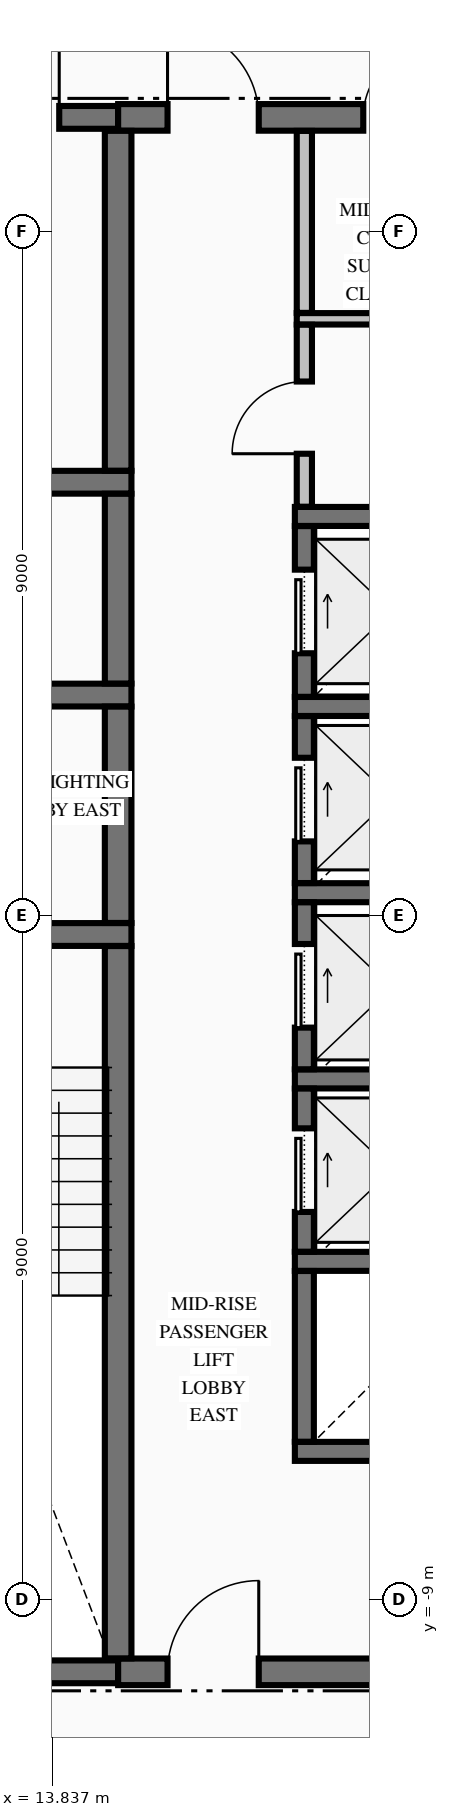
"""IFC4 building model, lengths in metres.
Left out: names, types, materials, properties, quantities, classifications, styles, units other than length and angle.
Written with IfcOpenShell. Run it as: python <this file> out.ifc"""

import sys

from ifc_helpers import new_model, si_unit, direction, frame, frame_2d, origin, place, context, subcontext, project, spatial, rectangle, extrude, element, fill, save


model = new_model("IFC4")
c1 = context("Model", 3, precision=1e-05, world=origin(), true_north=direction((0.0, 1.0)))
c2 = subcontext(c1, "Body", "Model", "MODEL_VIEW")
j1 = project(units=[si_unit("LENGTHUNIT", "METRE"), si_unit("PLANEANGLEUNIT", "RADIAN")], contexts=[c1])
p1 = place(None, origin())
s1 = spatial("IfcSite", under=j1, at=p1, CompositionType="ELEMENT")
p2 = place(p1, origin())
s2 = spatial("IfcBuilding", under=s1, at=p2, CompositionType="ELEMENT")
p3 = place(p2, frame((0.0, 0.0, 94.93)))
s3 = spatial("IfcBuildingStorey", under=s2, at=p3, CompositionType="ELEMENT", Elevation=94.93)
p4 = place(p3, frame((11.504, -9.95, 0.0), z_axis=(0.0, 0.0, 1.0), x_axis=(1.0, 0.0, 0.0)))
e1 = element("IfcWall", 1, at=p4, inside=s3, PredefinedType="SHEAR", context=c2, shape_type="SweptSolid", body=[
    extrude(rectangle(XDim=3.196, YDim=0.3, at=frame_2d((1.598, 0.0))), origin(), (0.0, 0.0, 1.0), 3.295),
])
p5 = place(p3, frame((14.7, -9.95, 0.0), z_axis=(0.0, 0.0, 1.0), x_axis=(1.0, 0.0, 0.0)))
e2 = element("IfcWall", 2, at=p5, inside=s3, PredefinedType="SHEAR", context=c2, shape_type="SweptSolid", body=[
    extrude(rectangle(XDim=4.796, YDim=0.35, at=frame_2d((2.398, 0.0))), origin(), (0.0, 0.0, 1.0), 3.295),
])
p6 = place(p5, frame((0.65, 0.0, 0.0)))
e3 = element("IfcOpeningElement", 3, at=p6, cuts=e2, PredefinedType="OPENING", context=c2, shape_type="SweptSolid", body=[
    extrude(rectangle(XDim=1.2, YDim=2.15, at=frame_2d((0.6, 1.075))), frame((0.0, 0.185, 0.0), z_axis=(0.0, -1.0, 0.0), x_axis=(1.0, 0.0, 0.0)), (0.0, 0.0, 1.0), 0.37),
])
for number, where, z_axis, x_axis in (
    (4, (17.025, -7.05, 0.0), (0.0, 0.0, 1.0), (1.0, 0.0, 0.0)),
    (5, (17.025, -4.55, 0.0), (0.0, 0.0, 1.0), (1.0, 0.0, 0.0)),
    (6, (17.025, -2.15, 0.0), (0.0, 0.0, 1.0), (1.0, 0.0, 0.0)),
):
    element("IfcWall", number, at=place(p3, frame(where, z_axis=z_axis, x_axis=x_axis)), inside=s3, PredefinedType="SOLIDWALL", context=c2, shape_type="SweptSolid", body=[
        extrude(rectangle(XDim=3.15, YDim=0.25, at=frame_2d((1.575, 0.0))), origin(), (0.0, 0.0, 1.0), 3.295),
    ])
p7 = place(p3, frame((11.504, -0.25, 0.0), z_axis=(0.0, 0.0, 1.0), x_axis=(1.0, 0.0, 0.0)))
e7 = element("IfcWall", 7, at=p7, inside=s3, PredefinedType="SHEAR", context=c2, shape_type="SweptSolid", body=[
    extrude(rectangle(XDim=3.371, YDim=0.3, at=frame_2d((1.686, 0.0))), origin(), (0.0, 0.0, 1.0), 3.295),
])
p8 = place(p7, frame((1.096, 0.0, 0.0)))
e8 = element("IfcOpeningElement", 8, at=p8, cuts=e7, PredefinedType="OPENING", context=c2, shape_type="SweptSolid", body=[
    extrude(rectangle(XDim=1.1, YDim=2.15, at=frame_2d((0.55, 1.075))), frame((0.0, 0.16, 0.0), z_axis=(0.0, -1.0, 0.0), x_axis=(1.0, 0.0, 0.0)), (0.0, 0.0, 1.0), 0.32),
])
p9 = place(p3, frame((17.025, 0.3, 0.0), z_axis=(0.0, 0.0, 1.0), x_axis=(1.0, 0.0, 0.0)))
e9 = element("IfcWall", 9, at=p9, inside=s3, PredefinedType="SOLIDWALL", context=c2, shape_type="SweptSolid", body=[
    extrude(rectangle(XDim=2.471, YDim=0.25, at=frame_2d((1.236, 0.0))), origin(), (0.0, 0.0, 1.0), 3.295),
])
p10 = place(p3, frame((17.025, 2.75, 0.0), z_axis=(0.0, 0.0, 1.0), x_axis=(1.0, 0.0, 0.0)))
e10 = element("IfcWall", 10, at=p10, inside=s3, PredefinedType="SOLIDWALL", context=c2, shape_type="SweptSolid", body=[
    extrude(rectangle(XDim=3.15, YDim=0.25, at=frame_2d((1.575, 0.0))), origin(), (0.0, 0.0, 1.0), 3.295),
])
p11 = place(p3, frame((10.85, 2.9, 0.0), z_axis=(0.0, 0.0, 1.0), x_axis=(1.0, 0.0, 0.0)))
e11 = element("IfcWall", 11, at=p11, inside=s3, PredefinedType="SHEAR", context=c2, shape_type="SweptSolid", body=[
    extrude(rectangle(XDim=4.025, YDim=0.3, at=frame_2d((2.012, 0.0))), origin(), (0.0, 0.0, 1.0), 3.295),
])
p12 = place(p11, frame((0.85, 0.0, 0.0)))
e12 = element("IfcOpeningElement", 12, at=p12, cuts=e11, PredefinedType="OPENING", context=c2, shape_type="SweptSolid", body=[
    extrude(rectangle(XDim=1.1, YDim=2.2, at=frame_2d((0.55, 1.1))), frame((0.0, 0.16, 0.0), z_axis=(0.0, -1.0, 0.0), x_axis=(1.0, 0.0, 0.0)), (0.0, 0.0, 1.0), 0.32),
])
p13 = place(p3, frame((17.025, 5.25, 0.0), z_axis=(0.0, 0.0, 1.0), x_axis=(1.0, 0.0, 0.0)))
e13 = element("IfcWall", 13, at=p13, inside=s3, PredefinedType="SOLIDWALL", context=c2, shape_type="SweptSolid", body=[
    extrude(rectangle(XDim=3.15, YDim=0.25, at=frame_2d((1.575, 0.0))), origin(), (0.0, 0.0, 1.0), 3.295),
])
p14 = place(p3, frame((10.85, 5.7, 0.0), z_axis=(0.0, 0.0, 1.0), x_axis=(1.0, 0.0, 0.0)))
e14 = element("IfcWall", 14, at=p14, inside=s3, PredefinedType="SHEAR", context=c2, shape_type="SweptSolid", body=[
    extrude(rectangle(XDim=4.025, YDim=0.3, at=frame_2d((2.012, 0.0))), origin(), (0.0, 0.0, 1.0), 3.295),
])
p15 = place(p3, frame((11.504, 10.5, 0.0), z_axis=(0.0, 0.0, 1.0), x_axis=(1.0, 0.0, 0.0)))
e15 = element("IfcWall", 15, at=p15, inside=s3, PredefinedType="SHEAR", context=c2, shape_type="SweptSolid", body=[
    extrude(rectangle(XDim=3.196, YDim=0.3, at=frame_2d((1.598, 0.0))), origin(), (0.0, 0.0, 1.0), 3.295),
])
p16 = place(p15, frame((1.471, 0.0, 0.0)))
e16 = element("IfcOpeningElement", 16, at=p16, cuts=e15, PredefinedType="OPENING", context=c2, shape_type="SweptSolid", body=[
    extrude(rectangle(XDim=0.95, YDim=2.15, at=frame_2d((0.475, 1.075))), frame((0.0, 0.16, 0.0), z_axis=(0.0, -1.0, 0.0), x_axis=(1.0, 0.0, 0.0)), (0.0, 0.0, 1.0), 0.32),
])
p17 = place(p3, frame((14.7, 10.5, 0.0), z_axis=(0.0, 0.0, 1.0), x_axis=(1.0, 0.0, 0.0)))
e17 = element("IfcWall", 17, at=p17, inside=s3, PredefinedType="SHEAR", context=c2, shape_type="SweptSolid", body=[
    extrude(rectangle(XDim=4.796, YDim=0.35, at=frame_2d((2.398, 0.0))), origin(), (0.0, 0.0, 1.0), 3.295),
])
p18 = place(p17, frame((0.65, 0.0, 0.0)))
e18 = element("IfcOpeningElement", 18, at=p18, cuts=e17, PredefinedType="OPENING", context=c2, shape_type="SweptSolid", body=[
    extrude(rectangle(XDim=1.2, YDim=2.15, at=frame_2d((0.6, 1.075))), frame((0.0, 0.185, 0.0), z_axis=(0.0, -1.0, 0.0), x_axis=(1.0, 0.0, 0.0)), (0.0, 0.0, 1.0), 0.37),
])
p19 = place(p17, frame((3.225, 0.0, 0.0)))
e19 = element("IfcOpeningElement", 19, at=p19, cuts=e17, PredefinedType="OPENING", context=c2, shape_type="SweptSolid", body=[
    extrude(rectangle(XDim=0.95, YDim=2.15, at=frame_2d((0.475, 1.075))), frame((0.0, 0.185, 0.0), z_axis=(0.0, -1.0, 0.0), x_axis=(1.0, 0.0, 0.0)), (0.0, 0.0, 1.0), 0.37),
])
p20 = place(p3, frame((17.05, 7.85, 0.0), z_axis=(0.0, 0.0, 1.0), x_axis=(1.0, 0.0, 0.0)))
e20 = element("IfcWall", 20, at=p20, inside=s3, PredefinedType="PARTITIONING", context=c2, shape_type="SweptSolid", body=[
    extrude(rectangle(XDim=2.772, YDim=0.15, at=frame_2d((1.386, 0.0))), origin(), (0.0, 0.0, 1.0), 3.295),
])
p21 = place(p3, frame((14.7, -9.773, 0.0), z_axis=(0.0, 0.0, 1.0), x_axis=(0.0, 1.0, 0.0)))
e21 = element("IfcWall", 21, at=p21, inside=s3, PredefinedType="SHEAR", context=c2, shape_type="SweptSolid", body=[
    extrude(rectangle(XDim=9.371, YDim=0.35, at=frame_2d((4.686, 0.0))), origin(), (0.0, 0.0, 1.0), 3.295),
])
p22 = place(p3, frame((14.7, -0.098, 0.0), z_axis=(0.0, 0.0, 1.0), x_axis=(0.0, 1.0, 0.0)))
e22 = element("IfcWall", 22, at=p22, inside=s3, PredefinedType="SHEAR", context=c2, shape_type="SweptSolid", body=[
    extrude(rectangle(XDim=2.846, YDim=0.35, at=frame_2d((1.423, 0.0))), origin(), (0.0, 0.0, 1.0), 3.295),
])
p23 = place(p3, frame((14.7, 3.052, 0.0), z_axis=(0.0, 0.0, 1.0), x_axis=(0.0, 1.0, 0.0)))
e23 = element("IfcWall", 23, at=p23, inside=s3, PredefinedType="SHEAR", context=c2, shape_type="SweptSolid", body=[
    extrude(rectangle(XDim=2.496, YDim=0.35, at=frame_2d((1.248, 0.0))), origin(), (0.0, 0.0, 1.0), 3.295),
])
p24 = place(p3, frame((14.7, 5.852, 0.0), z_axis=(0.0, 0.0, 1.0), x_axis=(0.0, 1.0, 0.0)))
e24 = element("IfcWall", 24, at=p24, inside=s3, PredefinedType="SHEAR", context=c2, shape_type="SweptSolid", body=[
    extrude(rectangle(XDim=4.471, YDim=0.35, at=frame_2d((2.235, 0.0))), origin(), (0.0, 0.0, 1.0), 3.295),
])
p25 = place(p3, frame((17.15, -6.923, 0.0), z_axis=(0.0, 0.0, 1.0), x_axis=(0.0, 1.0, 0.0)))
e25 = element("IfcWall", 25, at=p25, inside=s3, PredefinedType="SOLIDWALL", context=c2, shape_type="SweptSolid", body=[
    extrude(rectangle(XDim=2.246, YDim=0.25, at=frame_2d((1.123, 0.0))), origin(), (0.0, 0.0, 1.0), 3.295),
])
p26 = place(p3, frame((17.15, -4.423, 0.0), z_axis=(0.0, 0.0, 1.0), x_axis=(0.0, 1.0, 0.0)))
e26 = element("IfcWall", 26, at=p26, inside=s3, PredefinedType="SOLIDWALL", context=c2, shape_type="SweptSolid", body=[
    extrude(rectangle(XDim=2.146, YDim=0.25, at=frame_2d((1.073, 0.0))), origin(), (0.0, 0.0, 1.0), 3.295),
])
p27 = place(p26, frame((0.523, 0.0, 0.0)))
e27 = element("IfcOpeningElement", 27, at=p27, cuts=e26, PredefinedType="OPENING", context=c2, shape_type="SweptSolid", body=[
    extrude(rectangle(XDim=1.1, YDim=2.2, at=frame_2d((0.55, 1.1))), frame((0.0, 0.135, 0.0), z_axis=(0.0, -1.0, 0.0), x_axis=(1.0, 0.0, 0.0)), (0.0, 0.0, 1.0), 0.27),
])
p28 = place(p3, frame((17.15, -2.023, 0.0), z_axis=(0.0, 0.0, 1.0), x_axis=(0.0, 1.0, 0.0)))
e28 = element("IfcWall", 28, at=p28, inside=s3, PredefinedType="SOLIDWALL", context=c2, shape_type="SweptSolid", body=[
    extrude(rectangle(XDim=2.196, YDim=0.25, at=frame_2d((1.098, 0.0))), origin(), (0.0, 0.0, 1.0), 3.295),
])
p29 = place(p28, frame((0.548, 0.0, 0.0)))
e29 = element("IfcOpeningElement", 29, at=p29, cuts=e28, PredefinedType="OPENING", context=c2, shape_type="SweptSolid", body=[
    extrude(rectangle(XDim=1.1, YDim=2.2, at=frame_2d((0.55, 1.1))), frame((0.0, 0.135, 0.0), z_axis=(0.0, -1.0, 0.0), x_axis=(1.0, 0.0, 0.0)), (0.0, 0.0, 1.0), 0.27),
])
p30 = place(p3, frame((17.15, 0.427, 0.0), z_axis=(0.0, 0.0, 1.0), x_axis=(0.0, 1.0, 0.0)))
e30 = element("IfcWall", 30, at=p30, inside=s3, PredefinedType="SOLIDWALL", context=c2, shape_type="SweptSolid", body=[
    extrude(rectangle(XDim=2.196, YDim=0.25, at=frame_2d((1.098, 0.0))), origin(), (0.0, 0.0, 1.0), 3.295),
])
p31 = place(p30, frame((0.548, 0.0, 0.0)))
e31 = element("IfcOpeningElement", 31, at=p31, cuts=e30, PredefinedType="OPENING", context=c2, shape_type="SweptSolid", body=[
    extrude(rectangle(XDim=1.1, YDim=2.2, at=frame_2d((0.55, 1.1))), frame((0.0, 0.135, 0.0), z_axis=(0.0, -1.0, 0.0), x_axis=(1.0, 0.0, 0.0)), (0.0, 0.0, 1.0), 0.27),
])
p32 = place(p3, frame((17.15, 2.877, 0.0), z_axis=(0.0, 0.0, 1.0), x_axis=(0.0, 1.0, 0.0)))
e32 = element("IfcWall", 32, at=p32, inside=s3, PredefinedType="SOLIDWALL", context=c2, shape_type="SweptSolid", body=[
    extrude(rectangle(XDim=2.246, YDim=0.25, at=frame_2d((1.123, 0.0))), origin(), (0.0, 0.0, 1.0), 3.295),
])
p33 = place(p32, frame((0.573, 0.0, 0.0)))
e33 = element("IfcOpeningElement", 33, at=p33, cuts=e32, PredefinedType="OPENING", context=c2, shape_type="SweptSolid", body=[
    extrude(rectangle(XDim=1.1, YDim=2.2, at=frame_2d((0.55, 1.1))), frame((0.0, 0.135, 0.0), z_axis=(0.0, -1.0, 0.0), x_axis=(1.0, 0.0, 0.0)), (0.0, 0.0, 1.0), 0.27),
])
p34 = place(p3, frame((17.15, 5.378, 0.0), z_axis=(0.0, 0.0, 1.0), x_axis=(0.0, 1.0, 0.0)))
e34 = element("IfcWall", 34, at=p34, inside=s3, PredefinedType="PARTITIONING", context=c2, shape_type="SweptSolid", body=[
    extrude(rectangle(XDim=2.394, YDim=0.2, at=frame_2d((1.197, 0.0))), origin(), (0.0, 0.0, 1.0), 3.295),
])
p35 = place(p34, frame((0.697, 0.0, 0.0)))
e35 = element("IfcOpeningElement", 35, at=p35, cuts=e34, PredefinedType="OPENING", context=c2, shape_type="SweptSolid", body=[
    extrude(rectangle(XDim=0.95, YDim=2.15, at=frame_2d((0.475, 1.075))), frame((0.0, 0.11, 0.0), z_axis=(0.0, -1.0, 0.0), x_axis=(1.0, 0.0, 0.0)), (0.0, 0.0, 1.0), 0.22),
])
p36 = place(p3, frame((17.15, 7.928, 0.0), z_axis=(0.0, 0.0, 1.0), x_axis=(0.0, 1.0, 0.0)))
e36 = element("IfcWall", 36, at=p36, inside=s3, PredefinedType="PARTITIONING", context=c2, shape_type="SweptSolid", body=[
    extrude(rectangle(XDim=2.394, YDim=0.2, at=frame_2d((1.197, 0.0))), origin(), (0.0, 0.0, 1.0), 3.295),
])
p37 = place(p16, origin())
e37 = element("IfcDoor", 37, at=p37, inside=s3, OperationType="SINGLE_SWING_RIGHT", PredefinedType="DOOR", context=c2, shape_type="SweptSolid", body=[
    extrude(rectangle(XDim=0.95, YDim=2.15, at=frame_2d((0.475, 1.075))), frame((0.0, 0.025, 0.0), z_axis=(0.0, -1.0, 0.0), x_axis=(1.0, 0.0, 0.0)), (0.0, 0.0, 1.0), 0.05),
])
fill(e16, e37)
p38 = place(p27, origin())
e38 = element("IfcDoor", 38, at=p38, inside=s3, OperationType="SLIDING_TO_RIGHT", PredefinedType="DOOR", context=c2, shape_type="SweptSolid", body=[
    extrude(rectangle(XDim=1.1, YDim=2.2, at=frame_2d((0.55, 1.1))), frame((0.0, 0.025, 0.0), z_axis=(0.0, -1.0, 0.0), x_axis=(1.0, 0.0, 0.0)), (0.0, 0.0, 1.0), 0.05),
])
fill(e27, e38)
p39 = place(p29, origin())
e39 = element("IfcDoor", 39, at=p39, inside=s3, OperationType="SLIDING_TO_RIGHT", PredefinedType="DOOR", context=c2, shape_type="SweptSolid", body=[
    extrude(rectangle(XDim=1.1, YDim=2.2, at=frame_2d((0.55, 1.1))), frame((0.0, 0.025, 0.0), z_axis=(0.0, -1.0, 0.0), x_axis=(1.0, 0.0, 0.0)), (0.0, 0.0, 1.0), 0.05),
])
fill(e29, e39)
p40 = place(p31, origin())
e40 = element("IfcDoor", 40, at=p40, inside=s3, OperationType="SLIDING_TO_RIGHT", PredefinedType="DOOR", context=c2, shape_type="SweptSolid", body=[
    extrude(rectangle(XDim=1.1, YDim=2.2, at=frame_2d((0.55, 1.1))), frame((0.0, 0.025, 0.0), z_axis=(0.0, -1.0, 0.0), x_axis=(1.0, 0.0, 0.0)), (0.0, 0.0, 1.0), 0.05),
])
fill(e31, e40)
p41 = place(p33, origin())
e41 = element("IfcDoor", 41, at=p41, inside=s3, OperationType="SLIDING_TO_RIGHT", PredefinedType="DOOR", context=c2, shape_type="SweptSolid", body=[
    extrude(rectangle(XDim=1.1, YDim=2.2, at=frame_2d((0.55, 1.1))), frame((0.0, 0.025, 0.0), z_axis=(0.0, -1.0, 0.0), x_axis=(1.0, 0.0, 0.0)), (0.0, 0.0, 1.0), 0.05),
])
fill(e33, e41)
p42 = place(p6, origin())
e42 = element("IfcDoor", 42, at=p42, inside=s3, OperationType="SINGLE_SWING_RIGHT", PredefinedType="DOOR", context=c2, shape_type="SweptSolid", body=[
    extrude(rectangle(XDim=1.2, YDim=2.15, at=frame_2d((0.6, 1.075))), frame((0.0, 0.025, 0.0), z_axis=(0.0, -1.0, 0.0), x_axis=(1.0, 0.0, 0.0)), (0.0, 0.0, 1.0), 0.05),
])
fill(e3, e42)
p43 = place(p18, origin())
e43 = element("IfcDoor", 43, at=p43, inside=s3, OperationType="SINGLE_SWING_LEFT", PredefinedType="DOOR", context=c2, shape_type="SweptSolid", body=[
    extrude(rectangle(XDim=1.2, YDim=2.15, at=frame_2d((0.6, 1.075))), frame((0.0, 0.025, 0.0), z_axis=(0.0, -1.0, 0.0), x_axis=(1.0, 0.0, 0.0)), (0.0, 0.0, 1.0), 0.05),
])
fill(e18, e43)
p44 = place(p19, origin())
e44 = element("IfcDoor", 44, at=p44, inside=s3, OperationType="SINGLE_SWING_RIGHT", PredefinedType="DOOR", context=c2, shape_type="SweptSolid", body=[
    extrude(rectangle(XDim=0.95, YDim=2.15, at=frame_2d((0.475, 1.075))), frame((0.0, 0.025, 0.0), z_axis=(0.0, -1.0, 0.0), x_axis=(1.0, 0.0, 0.0)), (0.0, 0.0, 1.0), 0.05),
])
fill(e19, e44)
p45 = place(p35, origin())
e45 = element("IfcDoor", 45, at=p45, inside=s3, OperationType="SINGLE_SWING_LEFT", PredefinedType="DOOR", context=c2, shape_type="SweptSolid", body=[
    extrude(rectangle(XDim=0.95, YDim=2.15, at=frame_2d((0.475, 1.075))), frame((0.0, 0.025, 0.0), z_axis=(0.0, -1.0, 0.0), x_axis=(1.0, 0.0, 0.0)), (0.0, 0.0, 1.0), 0.05),
])
fill(e35, e45)
save(model, sys.argv[1])
